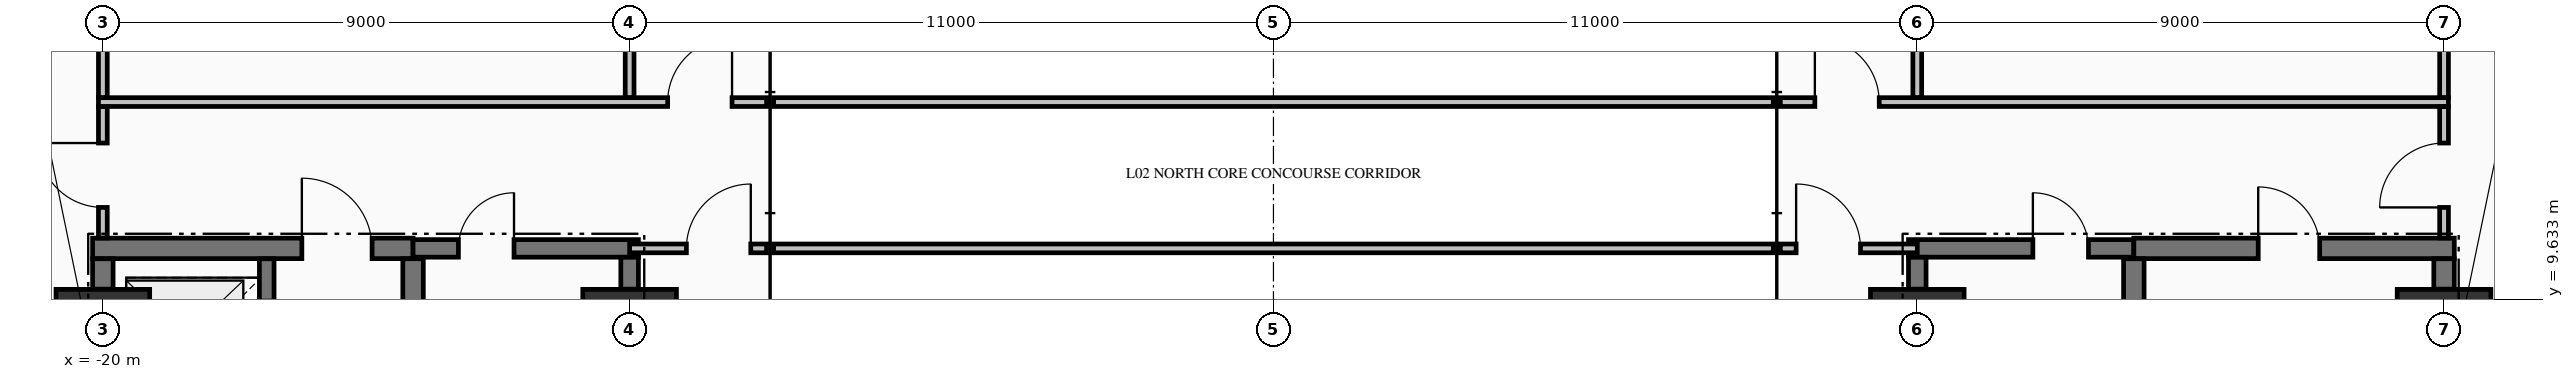
"""IFC4 building model, lengths in metres.
Left out: names, types, materials, properties, quantities, classifications, styles, units other than length and angle.
Written with IfcOpenShell. Run it as: python <this file> out.ifc"""

import sys

from ifc_helpers import new_model, si_unit, direction, frame, frame_2d, origin, origin_2d, place, context, subcontext, project, spatial, rectangle, extrude, element, fill, save


model = new_model("IFC4")
c1 = context("Model", 3, precision=1e-05, world=origin(), true_north=direction((0.0, 1.0)))
c2 = subcontext(c1, "Body", "Model", "MODEL_VIEW")
j1 = project(units=[si_unit("LENGTHUNIT", "METRE"), si_unit("PLANEANGLEUNIT", "RADIAN")], contexts=[c1])
p1 = place(None, origin())
s1 = spatial("IfcSite", under=j1, at=p1, CompositionType="ELEMENT")
p2 = place(p1, origin())
s2 = spatial("IfcBuilding", under=s1, at=p2, CompositionType="ELEMENT")
p3 = place(p2, frame((0.0, 0.0, 10.88)))
s3 = spatial("IfcBuildingStorey", under=s2, at=p3, CompositionType="ELEMENT", Elevation=10.88)
for number, where, z_axis, x_axis in (
    (1, (-20.0, 9.0, 0.0), (0.0, 0.0, 1.0), (1.0, 0.0, 0.0)),
    (2, (-11.0, 9.0, 0.0), (0.0, 0.0, 1.0), (1.0, 0.0, 0.0)),
    (3, (11.0, 9.0, 0.0), (0.0, 0.0, 1.0), (1.0, 0.0, 0.0)),
    (4, (20.0, 9.0, 0.0), (0.0, 0.0, 1.0), (1.0, 0.0, 0.0)),
):
    element("IfcColumn", number, at=place(p3, frame(where, z_axis=z_axis, x_axis=x_axis)), inside=s3, PredefinedType="COLUMN", context=c2, shape_type="SweptSolid", body=[
        extrude(rectangle(XDim=1.6, YDim=1.6, at=origin_2d()), origin(), (0.0, 0.0, 1.0), 5.09),
    ])
p4 = place(p3, frame((-20.175, 10.5, 0.0), z_axis=(0.0, 0.0, 1.0), x_axis=(1.0, 0.0, 0.0)))
e5 = element("IfcWall", 5, at=p4, inside=s3, PredefinedType="SHEAR", context=c2, shape_type="SweptSolid", body=[
    extrude(rectangle(XDim=5.475, YDim=0.35, at=frame_2d((2.738, 0.0))), origin(), (0.0, 0.0, 1.0), 5.09),
])
p5 = place(p4, frame((3.575, 0.0, 0.0)))
e6 = element("IfcOpeningElement", 6, at=p5, cuts=e5, PredefinedType="OPENING", context=c2, shape_type="SweptSolid", body=[
    extrude(rectangle(XDim=1.2, YDim=2.15, at=frame_2d((0.6, 1.075))), frame((0.0, 0.185, 0.0), z_axis=(0.0, -1.0, 0.0), x_axis=(1.0, 0.0, 0.0)), (0.0, 0.0, 1.0), 0.37),
])
p6 = place(p3, frame((-14.7, 10.5, 0.0), z_axis=(0.0, 0.0, 1.0), x_axis=(1.0, 0.0, 0.0)))
e7 = element("IfcWall", 7, at=p6, inside=s3, PredefinedType="SHEAR", context=c2, shape_type="SweptSolid", body=[
    extrude(rectangle(XDim=3.85, YDim=0.3, at=frame_2d((1.925, 0.0))), origin(), (0.0, 0.0, 1.0), 5.09),
])
p7 = place(p6, frame((0.775, 0.0, 0.0)))
e8 = element("IfcOpeningElement", 8, at=p7, cuts=e7, PredefinedType="OPENING", context=c2, shape_type="SweptSolid", body=[
    extrude(rectangle(XDim=0.95, YDim=2.15, at=frame_2d((0.475, 1.075))), frame((0.0, 0.16, 0.0), z_axis=(0.0, -1.0, 0.0), x_axis=(1.0, 0.0, 0.0)), (0.0, 0.0, 1.0), 0.32),
])
p8 = place(p3, frame((10.85, 10.5, 0.0), z_axis=(0.0, 0.0, 1.0), x_axis=(1.0, 0.0, 0.0)))
e9 = element("IfcWall", 9, at=p8, inside=s3, PredefinedType="SHEAR", context=c2, shape_type="SweptSolid", body=[
    extrude(rectangle(XDim=3.85, YDim=0.3, at=frame_2d((1.925, 0.0))), origin(), (0.0, 0.0, 1.0), 5.09),
])
p9 = place(p8, frame((2.125, 0.0, 0.0)))
e10 = element("IfcOpeningElement", 10, at=p9, cuts=e9, PredefinedType="OPENING", context=c2, shape_type="SweptSolid", body=[
    extrude(rectangle(XDim=0.95, YDim=2.15, at=frame_2d((0.475, 1.075))), frame((0.0, 0.16, 0.0), z_axis=(0.0, -1.0, 0.0), x_axis=(1.0, 0.0, 0.0)), (0.0, 0.0, 1.0), 0.32),
])
p10 = place(p3, frame((14.7, 10.5, 0.0), z_axis=(0.0, 0.0, 1.0), x_axis=(1.0, 0.0, 0.0)))
e11 = element("IfcWall", 11, at=p10, inside=s3, PredefinedType="SHEAR", context=c2, shape_type="SweptSolid", body=[
    extrude(rectangle(XDim=5.475, YDim=0.35, at=frame_2d((2.738, 0.0))), origin(), (0.0, 0.0, 1.0), 5.09),
])
p11 = place(p10, frame((2.125, 0.0, 0.0)))
e12 = element("IfcOpeningElement", 12, at=p11, cuts=e11, PredefinedType="OPENING", context=c2, shape_type="SweptSolid", body=[
    extrude(rectangle(XDim=1.05, YDim=2.15, at=frame_2d((0.525, 1.075))), frame((0.0, 0.185, 0.0), z_axis=(0.0, -1.0, 0.0), x_axis=(1.0, 0.0, 0.0)), (0.0, 0.0, 1.0), 0.37),
])
p12 = place(p3, frame((-11.0, 10.5, 0.0), z_axis=(0.0, 0.0, 1.0), x_axis=(1.0, 0.0, 0.0)))
e13 = element("IfcWall", 13, at=p12, inside=s3, PredefinedType="PARTITIONING", context=c2, shape_type="SweptSolid", body=[
    extrude(rectangle(XDim=2.34, YDim=0.15, at=frame_2d((1.17, 0.0))), origin(), (0.0, 0.0, 1.0), 5.09),
])
p13 = place(p12, frame((0.97, 0.0, 0.0)))
e14 = element("IfcOpeningElement", 14, at=p13, cuts=e13, PredefinedType="OPENING", context=c2, shape_type="SweptSolid", body=[
    extrude(rectangle(XDim=1.1, YDim=2.15, at=frame_2d((0.55, 1.075))), frame((0.0, 0.085, 0.0), z_axis=(0.0, -1.0, 0.0), x_axis=(1.0, 0.0, 0.0)), (0.0, 0.0, 1.0), 0.17),
])
p14 = place(p3, frame((-8.54, 10.5, 0.0), z_axis=(0.0, 0.0, 1.0), x_axis=(1.0, 0.0, 0.0)))
e15 = element("IfcWall", 15, at=p14, inside=s3, PredefinedType="PARTITIONING", context=c2, shape_type="SweptSolid", body=[
    extrude(rectangle(XDim=17.08, YDim=0.15, at=frame_2d((8.54, 0.0))), origin(), (0.0, 0.0, 1.0), 5.09),
])
p15 = place(p3, frame((8.66, 10.5, 0.0), z_axis=(0.0, 0.0, 1.0), x_axis=(1.0, 0.0, 0.0)))
e16 = element("IfcWall", 16, at=p15, inside=s3, PredefinedType="PARTITIONING", context=c2, shape_type="SweptSolid", body=[
    extrude(rectangle(XDim=2.34, YDim=0.15, at=frame_2d((1.17, 0.0))), origin(), (0.0, 0.0, 1.0), 5.09),
])
p16 = place(p15, frame((0.27, 0.0, 0.0)))
e17 = element("IfcOpeningElement", 17, at=p16, cuts=e16, PredefinedType="OPENING", context=c2, shape_type="SweptSolid", body=[
    extrude(rectangle(XDim=1.1, YDim=2.15, at=frame_2d((0.55, 1.075))), frame((0.0, 0.085, 0.0), z_axis=(0.0, -1.0, 0.0), x_axis=(1.0, 0.0, 0.0)), (0.0, 0.0, 1.0), 0.17),
])
p17 = place(p3, frame((-20.075, 13.0, 0.0), z_axis=(0.0, 0.0, 1.0), x_axis=(1.0, 0.0, 0.0)))
e18 = element("IfcWall", 18, at=p17, inside=s3, PredefinedType="PARTITIONING", context=c2, shape_type="SweptSolid", body=[
    extrude(rectangle(XDim=11.415, YDim=0.15, at=frame_2d((5.708, 0.0))), origin(), (0.0, 0.0, 1.0), 5.09),
])
p18 = place(p17, frame((9.725, 0.0, 0.0)))
e19 = element("IfcOpeningElement", 19, at=p18, cuts=e18, PredefinedType="OPENING", context=c2, shape_type="SweptSolid", body=[
    extrude(rectangle(XDim=1.1, YDim=2.15, at=frame_2d((0.55, 1.075))), frame((0.0, 0.085, 0.0), z_axis=(0.0, -1.0, 0.0), x_axis=(1.0, 0.0, 0.0)), (0.0, 0.0, 1.0), 0.17),
])
p19 = place(p3, frame((-8.54, 13.0, 0.0), z_axis=(0.0, 0.0, 1.0), x_axis=(1.0, 0.0, 0.0)))
e20 = element("IfcWall", 20, at=p19, inside=s3, PredefinedType="PARTITIONING", context=c2, shape_type="SweptSolid", body=[
    extrude(rectangle(XDim=17.08, YDim=0.15, at=frame_2d((8.54, 0.0))), origin(), (0.0, 0.0, 1.0), 5.09),
])
p20 = place(p3, frame((8.66, 13.0, 0.0), z_axis=(0.0, 0.0, 1.0), x_axis=(1.0, 0.0, 0.0)))
e21 = element("IfcWall", 21, at=p20, inside=s3, PredefinedType="PARTITIONING", context=c2, shape_type="SweptSolid", body=[
    extrude(rectangle(XDim=11.415, YDim=0.15, at=frame_2d((5.708, 0.0))), origin(), (0.0, 0.0, 1.0), 5.09),
])
p21 = place(p20, frame((0.59, 0.0, 0.0)))
e22 = element("IfcOpeningElement", 22, at=p21, cuts=e21, PredefinedType="OPENING", context=c2, shape_type="SweptSolid", body=[
    extrude(rectangle(XDim=1.1, YDim=2.15, at=frame_2d((0.55, 1.075))), frame((0.0, 0.085, 0.0), z_axis=(0.0, -1.0, 0.0), x_axis=(1.0, 0.0, 0.0)), (0.0, 0.0, 1.0), 0.17),
])
p22 = place(p3, frame((-20.0, 9.804, 0.0), z_axis=(0.0, 0.0, 1.0), x_axis=(0.0, 1.0, 0.0)))
e23 = element("IfcWall", 23, at=p22, inside=s3, PredefinedType="SHEAR", context=c2, shape_type="SweptSolid", body=[
    extrude(rectangle(XDim=0.519, YDim=0.35, at=frame_2d((0.26, 0.0))), origin(), (0.0, 0.0, 1.0), 5.09),
])
p23 = place(p3, frame((-17.2, 7.727, 0.0), z_axis=(0.0, 0.0, 1.0), x_axis=(0.0, 1.0, 0.0)))
e24 = element("IfcWall", 24, at=p23, inside=s3, PredefinedType="SOLIDWALL", context=c2, shape_type="SweptSolid", body=[
    extrude(rectangle(XDim=2.596, YDim=0.25, at=frame_2d((1.298, 0.0))), origin(), (0.0, 0.0, 1.0), 5.09),
])
p24 = place(p23, frame((0.773, 0.0, 0.0)))
e25 = element("IfcOpeningElement", 25, at=p24, cuts=e24, PredefinedType="OPENING", context=c2, shape_type="SweptSolid", body=[
    extrude(rectangle(XDim=1.1, YDim=2.2, at=frame_2d((0.55, 1.1))), frame((0.0, 0.135, 0.0), z_axis=(0.0, -1.0, 0.0), x_axis=(1.0, 0.0, 0.0)), (0.0, 0.0, 1.0), 0.27),
])
p25 = place(p3, frame((-14.7, 5.852, 0.0), z_axis=(0.0, 0.0, 1.0), x_axis=(0.0, 1.0, 0.0)))
e26 = element("IfcWall", 26, at=p25, inside=s3, PredefinedType="SHEAR", context=c2, shape_type="SweptSolid", body=[
    extrude(rectangle(XDim=4.471, YDim=0.35, at=frame_2d((2.235, 0.0))), origin(), (0.0, 0.0, 1.0), 5.09),
])
for number, where, z_axis, x_axis in (
    (27, (-11.0, 9.804, 0.0), (0.0, 0.0, 1.0), (0.0, 1.0, 0.0)),
    (28, (11.0, 9.804, 0.0), (0.0, 0.0, 1.0), (0.0, 1.0, 0.0)),
):
    element("IfcWall", number, at=place(p3, frame(where, z_axis=z_axis, x_axis=x_axis)), inside=s3, PredefinedType="SHEAR", context=c2, shape_type="SweptSolid", body=[
        extrude(rectangle(XDim=0.544, YDim=0.3, at=frame_2d((0.272, 0.0))), origin(), (0.0, 0.0, 1.0), 5.09),
    ])
p26 = place(p3, frame((14.7, 5.852, 0.0), z_axis=(0.0, 0.0, 1.0), x_axis=(0.0, 1.0, 0.0)))
e29 = element("IfcWall", 29, at=p26, inside=s3, PredefinedType="SHEAR", context=c2, shape_type="SweptSolid", body=[
    extrude(rectangle(XDim=4.471, YDim=0.35, at=frame_2d((2.235, 0.0))), origin(), (0.0, 0.0, 1.0), 5.09),
])
p27 = place(p3, frame((20.0, 9.804, 0.0), z_axis=(0.0, 0.0, 1.0), x_axis=(0.0, 1.0, 0.0)))
e30 = element("IfcWall", 30, at=p27, inside=s3, PredefinedType="SHEAR", context=c2, shape_type="SweptSolid", body=[
    extrude(rectangle(XDim=0.519, YDim=0.35, at=frame_2d((0.26, 0.0))), origin(), (0.0, 0.0, 1.0), 5.09),
])
p28 = place(p3, frame((-20.0, 10.678, 0.0), z_axis=(0.0, 0.0, 1.0), x_axis=(0.0, 1.0, 0.0)))
e31 = element("IfcWall", 31, at=p28, inside=s3, PredefinedType="PARTITIONING", context=c2, shape_type="SweptSolid", body=[
    extrude(rectangle(XDim=2.244, YDim=0.15, at=frame_2d((1.122, 0.0))), origin(), (0.0, 0.0, 1.0), 4.132),
])
p29 = place(p28, frame((0.522, 0.0, 0.0)))
e32 = element("IfcOpeningElement", 32, at=p29, cuts=e31, PredefinedType="OPENING", context=c2, shape_type="SweptSolid", body=[
    extrude(rectangle(XDim=1.1, YDim=2.15, at=frame_2d((0.55, 1.075))), frame((0.0, 0.085, 0.0), z_axis=(0.0, -1.0, 0.0), x_axis=(1.0, 0.0, 0.0)), (0.0, 0.0, 1.0), 0.17),
])
for number, where, z_axis, x_axis in (
    (33, (-20.0, 13.078, 0.0), (0.0, 0.0, 1.0), (0.0, 1.0, 0.0)),
    (34, (-11.0, 13.078, 0.0), (0.0, 0.0, 1.0), (0.0, 1.0, 0.0)),
    (35, (11.0, 13.078, 0.0), (0.0, 0.0, 1.0), (0.0, 1.0, 0.0)),
):
    element("IfcWall", number, at=place(p3, frame(where, z_axis=z_axis, x_axis=x_axis)), inside=s3, PredefinedType="PARTITIONING", context=c2, shape_type="SweptSolid", body=[
        extrude(rectangle(XDim=2.116, YDim=0.15, at=frame_2d((1.058, 0.0))), origin(), (0.0, 0.0, 1.0), 4.132),
    ])
p30 = place(p3, frame((20.0, 10.678, 0.0), z_axis=(0.0, 0.0, 1.0), x_axis=(0.0, 1.0, 0.0)))
e36 = element("IfcWall", 36, at=p30, inside=s3, PredefinedType="PARTITIONING", context=c2, shape_type="SweptSolid", body=[
    extrude(rectangle(XDim=2.244, YDim=0.15, at=frame_2d((1.122, 0.0))), origin(), (0.0, 0.0, 1.0), 4.132),
])
p31 = place(p30, frame((0.522, 0.0, 0.0)))
e37 = element("IfcOpeningElement", 37, at=p31, cuts=e36, PredefinedType="OPENING", context=c2, shape_type="SweptSolid", body=[
    extrude(rectangle(XDim=1.1, YDim=2.15, at=frame_2d((0.55, 1.075))), frame((0.0, 0.085, 0.0), z_axis=(0.0, -1.0, 0.0), x_axis=(1.0, 0.0, 0.0)), (0.0, 0.0, 1.0), 0.17),
])
p32 = place(p3, frame((20.0, 13.078, 0.0), z_axis=(0.0, 0.0, 1.0), x_axis=(0.0, 1.0, 0.0)))
e38 = element("IfcWall", 38, at=p32, inside=s3, PredefinedType="PARTITIONING", context=c2, shape_type="SweptSolid", body=[
    extrude(rectangle(XDim=2.116, YDim=0.15, at=frame_2d((1.058, 0.0))), origin(), (0.0, 0.0, 1.0), 4.132),
])
p33 = place(p7, origin())
e39 = element("IfcDoor", 39, at=p33, inside=s3, OperationType="SINGLE_SWING_RIGHT", PredefinedType="DOOR", context=c2, shape_type="SweptSolid", body=[
    extrude(rectangle(XDim=0.95, YDim=2.15, at=frame_2d((0.475, 1.075))), frame((0.0, 0.025, 0.0), z_axis=(0.0, -1.0, 0.0), x_axis=(1.0, 0.0, 0.0)), (0.0, 0.0, 1.0), 0.05),
])
fill(e8, e39)
p34 = place(p9, origin())
e40 = element("IfcDoor", 40, at=p34, inside=s3, OperationType="SINGLE_SWING_LEFT", PredefinedType="DOOR", context=c2, shape_type="SweptSolid", body=[
    extrude(rectangle(XDim=0.95, YDim=2.15, at=frame_2d((0.475, 1.075))), frame((0.0, 0.025, 0.0), z_axis=(0.0, -1.0, 0.0), x_axis=(1.0, 0.0, 0.0)), (0.0, 0.0, 1.0), 0.05),
])
fill(e10, e40)
p35 = place(p5, origin())
e41 = element("IfcDoor", 41, at=p35, inside=s3, OperationType="SINGLE_SWING_LEFT", PredefinedType="DOOR", context=c2, shape_type="SweptSolid", body=[
    extrude(rectangle(XDim=1.2, YDim=2.15, at=frame_2d((0.6, 1.075))), frame((0.0, 0.025, 0.0), z_axis=(0.0, -1.0, 0.0), x_axis=(1.0, 0.0, 0.0)), (0.0, 0.0, 1.0), 0.05),
])
fill(e6, e41)
p36 = place(p11, origin())
e42 = element("IfcDoor", 42, at=p36, inside=s3, OperationType="SINGLE_SWING_LEFT", PredefinedType="DOOR", context=c2, shape_type="SweptSolid", body=[
    extrude(rectangle(XDim=1.05, YDim=2.15, at=frame_2d((0.525, 1.075))), frame((0.0, 0.025, 0.0), z_axis=(0.0, -1.0, 0.0), x_axis=(1.0, 0.0, 0.0)), (0.0, 0.0, 1.0), 0.05),
])
fill(e12, e42)
p37 = place(p18, origin())
e43 = element("IfcDoor", 43, at=p37, inside=s3, OperationType="SINGLE_SWING_RIGHT", PredefinedType="DOOR", context=c2, shape_type="SweptSolid", body=[
    extrude(rectangle(XDim=1.1, YDim=2.15, at=frame_2d((0.55, 1.075))), frame((0.0, 0.025, 0.0), z_axis=(0.0, -1.0, 0.0), x_axis=(1.0, 0.0, 0.0)), (0.0, 0.0, 1.0), 0.05),
])
fill(e19, e43)
p38 = place(p21, origin())
e44 = element("IfcDoor", 44, at=p38, inside=s3, OperationType="SINGLE_SWING_LEFT", PredefinedType="DOOR", context=c2, shape_type="SweptSolid", body=[
    extrude(rectangle(XDim=1.1, YDim=2.15, at=frame_2d((0.55, 1.075))), frame((0.0, 0.025, 0.0), z_axis=(0.0, -1.0, 0.0), x_axis=(1.0, 0.0, 0.0)), (0.0, 0.0, 1.0), 0.05),
])
fill(e22, e44)
p39 = place(p13, origin())
e45 = element("IfcDoor", 45, at=p39, inside=s3, OperationType="SINGLE_SWING_RIGHT", PredefinedType="DOOR", context=c2, shape_type="SweptSolid", body=[
    extrude(rectangle(XDim=1.1, YDim=2.15, at=frame_2d((0.55, 1.075))), frame((0.0, 0.025, 0.0), z_axis=(0.0, -1.0, 0.0), x_axis=(1.0, 0.0, 0.0)), (0.0, 0.0, 1.0), 0.05),
])
fill(e14, e45)
p40 = place(p16, origin())
e46 = element("IfcDoor", 46, at=p40, inside=s3, OperationType="SINGLE_SWING_LEFT", PredefinedType="DOOR", context=c2, shape_type="SweptSolid", body=[
    extrude(rectangle(XDim=1.1, YDim=2.15, at=frame_2d((0.55, 1.075))), frame((0.0, 0.025, 0.0), z_axis=(0.0, -1.0, 0.0), x_axis=(1.0, 0.0, 0.0)), (0.0, 0.0, 1.0), 0.05),
])
fill(e17, e46)
p41 = place(p29, origin())
e47 = element("IfcDoor", 47, at=p41, inside=s3, OperationType="SINGLE_SWING_RIGHT", PredefinedType="DOOR", context=c2, shape_type="SweptSolid", body=[
    extrude(rectangle(XDim=1.1, YDim=2.15, at=frame_2d((0.55, 1.075))), frame((0.0, 0.025, 0.0), z_axis=(0.0, -1.0, 0.0), x_axis=(1.0, 0.0, 0.0)), (0.0, 0.0, 1.0), 0.05),
])
fill(e32, e47)
p42 = place(p31, origin())
e48 = element("IfcDoor", 48, at=p42, inside=s3, OperationType="SINGLE_SWING_LEFT", PredefinedType="DOOR", context=c2, shape_type="SweptSolid", body=[
    extrude(rectangle(XDim=1.1, YDim=2.15, at=frame_2d((0.55, 1.075))), frame((0.0, 0.025, 0.0), z_axis=(0.0, -1.0, 0.0), x_axis=(1.0, 0.0, 0.0)), (0.0, 0.0, 1.0), 0.05),
])
fill(e37, e48)
save(model, sys.argv[1])
